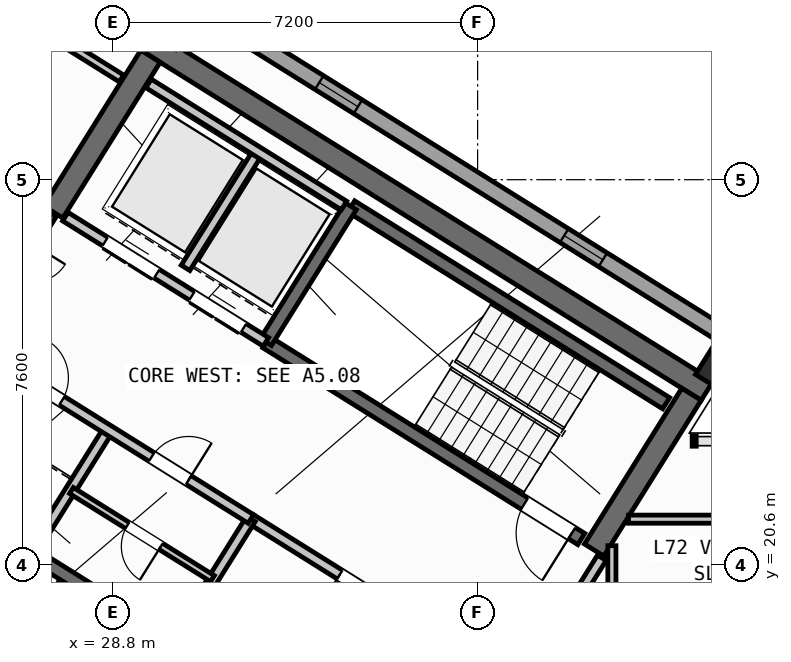
"""IFC4 building model, lengths in metres.
Left out: names, types, materials, properties, quantities, classifications, styles, units other than length and angle.
Written with IfcOpenShell. Run it as: python <this file> out.ifc"""

import sys

from ifc_helpers import new_model, si_unit, direction, frame, frame_2d, origin, origin_2d, place, context, subcontext, project, spatial, rectangle, hollow_rectangle, extrude, source, transform, mapped, element, fill, save


model = new_model("IFC4")
c1 = context("Model", 3, precision=1e-05, world=origin(), true_north=direction((0.0, 1.0)))
c2 = subcontext(c1, "Body", "Model", "MODEL_VIEW")
j1 = project(units=[si_unit("LENGTHUNIT", "METRE"), si_unit("PLANEANGLEUNIT", "RADIAN")], contexts=[c1])
p1 = place(None, origin())
s1 = spatial("IfcSite", under=j1, at=p1, CompositionType="ELEMENT")
p2 = place(p1, origin())
s2 = spatial("IfcBuilding", under=s1, at=p2, CompositionType="ELEMENT")
p3 = place(p2, frame((0.0, 0.0, 284.4)))
s3 = spatial("IfcBuildingStorey", under=s2, at=p3, CompositionType="ELEMENT", Elevation=284.4)
p4 = place(p3, frame((40.531, 24.036, 0.0), z_axis=(0.0, 0.0, 1.0), x_axis=(-0.848048787466, 0.529918157905, 0.0)))
e1 = element("IfcWall", 1, at=p4, inside=s3, PredefinedType="SHEAR", context=c2, shape_type="SweptSolid", body=[
    extrude(rectangle(XDim=13.04, YDim=0.45, at=frame_2d((6.52, 0.0))), origin(), (0.0, 0.0, 1.0), 3.35),
])
for number, where, z_axis, x_axis in (
    (2, (40.221, 23.965, 0.0), (0.0, 0.0, 1.0), (-0.53, -0.848, 0.0)),
    (3, (29.544, 30.636, 0.0), (0.0, 0.0, 1.0), (-0.53, -0.848, 0.0)),
):
    element("IfcWall", number, at=place(p3, frame(where, z_axis=z_axis, x_axis=x_axis)), inside=s3, PredefinedType="SHEAR", context=c2, shape_type="SweptSolid", body=[
        extrude(rectangle(XDim=3.625, YDim=0.45, at=frame_2d((1.812, 0.0))), origin(), (0.0, 0.0, 1.0), 3.35),
    ])
m1 = source(origin(), c2, "Body", "SweptSolid", [
    extrude(hollow_rectangle(XDim=0.7, YDim=0.7, WallThickness=0.028, at=origin_2d()), origin(), (0.0, 0.0, 1.0), 3.6),
])
p5 = place(p3, frame((40.783, 24.469, 0.0), z_axis=(0.0, 0.0, 1.0), x_axis=(-0.848048096156, 0.529919264233, 0.0)))
e4 = element("IfcColumn", 4, at=p5, inside=s3, PredefinedType="COLUMN", context=c2, shape_type="MappedRepresentation", body=[
    mapped(m1, transform((0.0, 0.0, 0.0), scale=1.0)),
])
p6 = place(p3, frame((19.566, 38.434, 0.0), z_axis=(0.0, 0.0, 1.0), x_axis=(0.84804567626, -0.529923136858, 0.0)))
e5 = element("IfcWall", 5, at=p6, inside=s3, PredefinedType="STANDARD", context=c2, shape_type="SweptSolid", body=[
    extrude(rectangle(XDim=25.188, YDim=0.32, at=frame_2d((12.594, 0.0))), origin(), (0.0, 0.0, 1.0), 3.35),
])
p7 = place(p6, frame((3.355, 0.0, 0.0)))
e6 = element("IfcOpeningElement", 6, at=p7, cuts=e5, PredefinedType="OPENING", context=c2, shape_type="SweptSolid", body=[
    extrude(rectangle(XDim=1.05, YDim=2.15, at=frame_2d((0.525, 1.075))), frame((0.0, 0.17, 0.0), z_axis=(0.0, -1.0, 0.0), x_axis=(1.0, 0.0, 0.0)), (0.0, 0.0, 1.0), 0.34),
])
p8 = place(p6, frame((0.939, 0.0, 0.9)))
e7 = element("IfcOpeningElement", 7, at=p8, cuts=e5, PredefinedType="OPENING", context=c2, shape_type="SweptSolid", body=[
    extrude(rectangle(XDim=1.65, YDim=1.45, at=frame_2d((0.825, 0.725))), frame((0.0, 0.17, 0.0), z_axis=(0.0, -1.0, 0.0), x_axis=(1.0, 0.0, 0.0)), (0.0, 0.0, 1.0), 0.34),
])
p9 = place(p6, frame((7.499, 0.0, 0.9)))
e8 = element("IfcOpeningElement", 8, at=p9, cuts=e5, PredefinedType="OPENING", context=c2, shape_type="SweptSolid", body=[
    extrude(rectangle(XDim=1.35, YDim=1.45, at=frame_2d((0.675, 0.725))), frame((0.0, 0.17, 0.0), z_axis=(0.0, -1.0, 0.0), x_axis=(1.0, 0.0, 0.0)), (0.0, 0.0, 1.0), 0.34),
])
p10 = place(p6, frame((10.754, 0.0, 1.0)))
e9 = element("IfcOpeningElement", 9, at=p10, cuts=e5, PredefinedType="OPENING", context=c2, shape_type="SweptSolid", body=[
    extrude(rectangle(XDim=0.9, YDim=1.25, at=frame_2d((0.45, 0.625))), frame((0.0, 0.17, 0.0), z_axis=(0.0, -1.0, 0.0), x_axis=(1.0, 0.0, 0.0)), (0.0, 0.0, 1.0), 0.34),
])
p11 = place(p6, frame((15.694, 0.0, 1.0)))
e10 = element("IfcOpeningElement", 10, at=p11, cuts=e5, PredefinedType="OPENING", context=c2, shape_type="SweptSolid", body=[
    extrude(rectangle(XDim=0.9, YDim=1.25, at=frame_2d((0.45, 0.625))), frame((0.0, 0.17, 0.0), z_axis=(0.0, -1.0, 0.0), x_axis=(1.0, 0.0, 0.0)), (0.0, 0.0, 1.0), 0.34),
])
p12 = place(p6, frame((21.394, 0.0, 1.0)))
e11 = element("IfcOpeningElement", 11, at=p12, cuts=e5, PredefinedType="OPENING", context=c2, shape_type="SweptSolid", body=[
    extrude(rectangle(XDim=0.9, YDim=1.25, at=frame_2d((0.45, 0.625))), frame((0.0, 0.17, 0.0), z_axis=(0.0, -1.0, 0.0), x_axis=(1.0, 0.0, 0.0)), (0.0, 0.0, 1.0), 0.34),
])
p13 = place(p3, frame((31.28, 18.261, 0.0), z_axis=(0.0, 0.0, 1.0), x_axis=(-0.848051618787, 0.529913626805, 0.0)))
e12 = element("IfcWall", 12, at=p13, inside=s3, PredefinedType="SHEAR", context=c2, shape_type="SweptSolid", body=[
    extrude(rectangle(XDim=7.46, YDim=0.26, at=frame_2d((3.73, 0.0))), origin(), (0.0, 0.0, 1.0), 3.35),
])
p14 = place(p13, frame((0.36, 0.0, 0.0)))
e13 = element("IfcOpeningElement", 13, at=p14, cuts=e12, PredefinedType="OPENING", context=c2, shape_type="SweptSolid", body=[
    extrude(rectangle(XDim=0.86, YDim=2.05, at=frame_2d((0.43, 1.025))), frame((0.0, 0.14, 0.0), z_axis=(0.0, -1.0, 0.0), x_axis=(1.0, 0.0, 0.0)), (0.0, 0.0, 1.0), 0.28),
])
p15 = place(p3, frame((39.721, 23.788, 0.0), z_axis=(0.0, 0.0, 1.0), x_axis=(-0.848054434086, 0.529909121291, 0.0)))
e14 = element("IfcWall", 14, at=p15, inside=s3, PredefinedType="SHEAR", context=c2, shape_type="SweptSolid", body=[
    extrude(rectangle(XDim=7.33, YDim=0.26, at=frame_2d((3.665, 0.0))), origin(), (0.0, 0.0, 1.0), 3.35),
])
p16 = place(p3, frame((38.046, 21.108, 0.0), z_axis=(0.0, 0.0, 1.0), x_axis=(-0.848054434086, 0.529909121291, 0.0)))
e15 = element("IfcWall", 15, at=p16, inside=s3, PredefinedType="SHEAR", context=c2, shape_type="SweptSolid", body=[
    extrude(rectangle(XDim=7.33, YDim=0.26, at=frame_2d((3.665, 0.0))), origin(), (0.0, 0.0, 1.0), 3.35),
])
p17 = place(p16, frame((0.22, 0.0, 0.0)))
e16 = element("IfcOpeningElement", 16, at=p17, cuts=e15, PredefinedType="OPENING", context=c2, shape_type="SweptSolid", body=[
    extrude(rectangle(XDim=1.1, YDim=2.1, at=frame_2d((0.55, 1.05))), frame((0.0, 0.14, 0.0), z_axis=(0.0, -1.0, 0.0), x_axis=(1.0, 0.0, 0.0)), (0.0, 0.0, 1.0), 0.28),
])
p18 = place(p3, frame((33.496, 27.677, 0.0), z_axis=(0.0, 0.0, 1.0), x_axis=(-0.529908658664, -0.84805472316, 0.0)))
e17 = element("IfcWall", 17, at=p18, inside=s3, PredefinedType="SHEAR", context=c2, shape_type="SweptSolid", body=[
    extrude(rectangle(XDim=3.16, YDim=0.26, at=frame_2d((1.58, 0.0))), origin(), (0.0, 0.0, 1.0), 3.35),
])
p19 = place(p3, frame((36.459, 18.421, 0.0), z_axis=(0.0, 0.0, 1.0), x_axis=(-0.848059591691, 0.529900867089, 0.0)))
e18 = element("IfcWall", 18, at=p19, inside=s3, PredefinedType="STANDARD", context=c2, shape_type="SweptSolid", body=[
    extrude(rectangle(XDim=5.818, YDim=0.2, at=frame_2d((2.909, 0.0))), origin(), (0.0, 0.0, 1.0), 3.34),
])
p20 = place(p19, frame((2.598, 0.0, 0.0)))
e19 = element("IfcOpeningElement", 19, at=p20, cuts=e18, PredefinedType="OPENING", context=c2, shape_type="SweptSolid", body=[
    extrude(rectangle(XDim=1.15, YDim=2.1, at=frame_2d((0.575, 1.05))), frame((0.0, 0.11, 0.0), z_axis=(0.0, -1.0, 0.0), x_axis=(1.0, 0.0, 0.0)), (0.0, 0.0, 1.0), 0.22),
])
p21 = place(p3, frame((31.822, 24.998, 0.0), z_axis=(0.0, 0.0, 1.0), x_axis=(-0.848054125777, 0.529909614701, 0.0)))
e20 = element("IfcWall", 20, at=p21, inside=s3, PredefinedType="STANDARD", context=c2, shape_type="SweptSolid", body=[
    extrude(rectangle(XDim=4.668, YDim=0.2, at=frame_2d((2.334, 0.0))), origin(), (0.0, 0.0, 1.0), 3.34),
])
p22 = place(p21, frame((0.52, 0.0, 0.0)))
e21 = element("IfcOpeningElement", 21, at=p22, cuts=e20, PredefinedType="OPENING", context=c2, shape_type="SweptSolid", body=[
    extrude(rectangle(XDim=1.2, YDim=2.15, at=frame_2d((0.6, 1.075))), frame((0.0, 0.11, 0.0), z_axis=(0.0, -1.0, 0.0), x_axis=(1.0, 0.0, 0.0)), (0.0, 0.0, 1.0), 0.22),
])
p23 = place(p21, frame((2.54, 0.0, 0.0)))
e22 = element("IfcOpeningElement", 22, at=p23, cuts=e20, PredefinedType="OPENING", context=c2, shape_type="SweptSolid", body=[
    extrude(rectangle(XDim=1.2, YDim=2.15, at=frame_2d((0.6, 1.075))), frame((0.0, 0.11, 0.0), z_axis=(0.0, -1.0, 0.0), x_axis=(1.0, 0.0, 0.0)), (0.0, 0.0, 1.0), 0.22),
])
p24 = place(p3, frame((31.645, 28.716, 0.0), z_axis=(0.0, 0.0, 1.0), x_axis=(-0.52986693015, -0.848080795876, 0.0)))
e23 = element("IfcWall", 23, at=p24, inside=s3, PredefinedType="STANDARD", context=c2, shape_type="SweptSolid", body=[
    extrude(rectangle(XDim=2.66, YDim=0.2, at=frame_2d((1.33, 0.0))), origin(), (0.0, 0.0, 1.0), 3.34),
])
p25 = place(p3, frame((33.363, 27.69, 0.0), z_axis=(0.0, 0.0, 1.0), x_axis=(-0.84804957148, 0.529916903215, 0.0)))
e24 = element("IfcWall", 24, at=p25, inside=s3, PredefinedType="STANDARD", context=c2, shape_type="SweptSolid", body=[
    extrude(rectangle(XDim=4.548, YDim=0.2, at=frame_2d((2.274, 0.0))), origin(), (0.0, 0.0, 1.0), 3.34),
])
for number, where, z_axis, x_axis in (
    (25, (31.525, 21.504, 0.0), (0.0, 0.0, 1.0), (-0.53, -0.848, 0.0)),
    (26, (28.71, 23.263, 0.0), (0.0, 0.0, 1.0), (-0.53, -0.848, 0.0)),
):
    element("IfcWall", number, at=place(p3, frame(where, z_axis=z_axis, x_axis=x_axis)), inside=s3, PredefinedType="STANDARD", context=c2, shape_type="SweptSolid", body=[
        extrude(rectangle(XDim=2.88, YDim=0.2, at=frame_2d((1.44, 0.0))), origin(), (0.0, 0.0, 1.0), 3.34),
    ])
p26 = place(p3, frame((31.525, 21.504, 0.0), z_axis=(0.0, 0.0, 1.0), x_axis=(-0.848042066329, 0.529928913853, 0.0)))
e27 = element("IfcWall", 27, at=p26, inside=s3, PredefinedType="STANDARD", context=c2, shape_type="SweptSolid", body=[
    extrude(rectangle(XDim=6.268, YDim=0.2, at=frame_2d((3.134, 0.0))), origin(), (0.0, 0.0, 1.0), 3.34),
])
p27 = place(p26, frame((4.4, 0.0, 0.0)))
e28 = element("IfcOpeningElement", 28, at=p27, cuts=e27, PredefinedType="OPENING", context=c2, shape_type="SweptSolid", body=[
    extrude(rectangle(XDim=0.86, YDim=2.05, at=frame_2d((0.43, 1.025))), frame((0.0, 0.11, 0.0), z_axis=(0.0, -1.0, 0.0), x_axis=(1.0, 0.0, 0.0)), (0.0, 0.0, 1.0), 0.22),
])
p28 = place(p26, frame((1.45, 0.0, 0.0)))
e29 = element("IfcOpeningElement", 29, at=p28, cuts=e27, PredefinedType="OPENING", context=c2, shape_type="SweptSolid", body=[
    extrude(rectangle(XDim=0.86, YDim=2.05, at=frame_2d((0.43, 1.025))), frame((0.0, 0.11, 0.0), z_axis=(0.0, -1.0, 0.0), x_axis=(1.0, 0.0, 0.0)), (0.0, 0.0, 1.0), 0.22),
])
p29 = place(p3, frame((30.766, 20.327, 0.0), z_axis=(0.0, 0.0, 1.0), x_axis=(-0.848052663127, 0.529911955482, 0.0)))
e30 = element("IfcWall", 30, at=p29, inside=s3, PredefinedType="PLUMBINGWALL", context=c2, shape_type="SweptSolid", body=[
    extrude(rectangle(XDim=3.28, YDim=0.14, at=frame_2d((1.64, 0.0))), origin(), (0.0, 0.0, 1.0), 3.34),
])
p30 = place(p29, frame((1.2, 0.0, 0.0)))
e31 = element("IfcOpeningElement", 31, at=p30, cuts=e30, PredefinedType="OPENING", context=c2, shape_type="SweptSolid", body=[
    extrude(rectangle(XDim=0.78, YDim=2.05, at=frame_2d((0.39, 1.025))), frame((0.0, 0.08, 0.0), z_axis=(0.0, -1.0, 0.0), x_axis=(1.0, 0.0, 0.0)), (0.0, 0.0, 1.0), 0.16),
])
p31 = place(p3, frame((27.596, 27.52, 0.0), z_axis=(0.0, 0.0, 1.0), x_axis=(-0.529865479138, -0.848081702443, 0.0)))
e32 = element("IfcWall", 32, at=p31, inside=s3, PredefinedType="STANDARD", context=c2, shape_type="SweptSolid", body=[
    extrude(rectangle(XDim=2.96, YDim=0.2, at=frame_2d((1.48, 0.0))), origin(), (0.0, 0.0, 1.0), 3.34),
])
p32 = place(p31, frame((0.7, 0.0, 0.0)))
e33 = element("IfcOpeningElement", 33, at=p32, cuts=e32, PredefinedType="OPENING", context=c2, shape_type="SweptSolid", body=[
    extrude(rectangle(XDim=1.5, YDim=2.15, at=frame_2d((0.75, 1.075))), frame((0.0, 0.11, 0.0), z_axis=(0.0, -1.0, 0.0), x_axis=(1.0, 0.0, 0.0)), (0.0, 0.0, 1.0), 0.22),
])
p33 = place(p3, frame((28.972, 30.198, 0.0), z_axis=(0.0, 0.0, 1.0), x_axis=(-0.848015752453, 0.529971021464, 0.0)))
e34 = element("IfcWall", 34, at=p33, inside=s3, PredefinedType="PARTITIONING", context=c2, shape_type="SweptSolid", body=[
    extrude(rectangle(XDim=2.358, YDim=0.16, at=frame_2d((1.179, 0.0))), origin(), (0.0, 0.0, 1.0), 3.34),
])
p34 = place(p3, frame((38.451, 20.737, 0.0), z_axis=(0.0, 0.0, 1.0), x_axis=(-0.529924799939, -0.848044637038, 0.0)))
e35 = element("IfcWall", 35, at=p34, inside=s3, PredefinedType="STANDARD", context=c2, shape_type="SweptSolid", body=[
    extrude(rectangle(XDim=2.96, YDim=0.2, at=frame_2d((1.48, 0.0))), origin(), (0.0, 0.0, 1.0), 3.34),
])
p35 = place(p34, frame((1.46, 0.0, 0.0)))
e36 = element("IfcOpeningElement", 36, at=p35, cuts=e35, PredefinedType="OPENING", context=c2, shape_type="SweptSolid", body=[
    extrude(rectangle(XDim=0.86, YDim=2.05, at=frame_2d((0.43, 1.025))), frame((0.0, 0.11, 0.0), z_axis=(0.0, -1.0, 0.0), x_axis=(1.0, 0.0, 0.0)), (0.0, 0.0, 1.0), 0.22),
])
p36 = place(p3, frame((38.65, 17.93, 0.0), z_axis=(0.0, 0.0, 1.0), x_axis=(0.0, 1.0, 0.0)))
e37 = element("IfcWall", 37, at=p36, inside=s3, PredefinedType="PARTITIONING", context=c2, shape_type="SweptSolid", body=[
    extrude(rectangle(XDim=3.046, YDim=0.16, at=frame_2d((1.523, 0.0))), origin(), (0.0, 0.0, 1.0), 3.34),
])
p37 = place(p3, frame((38.978, 21.5, 0.0), z_axis=(0.0, 0.0, 1.0), x_axis=(1.0, 0.0, 0.0)))
e38 = element("IfcWall", 38, at=p37, inside=s3, PredefinedType="PARTITIONING", context=c2, shape_type="SweptSolid", body=[
    extrude(rectangle(XDim=3.823, YDim=0.16, at=frame_2d((1.911, 0.0))), origin(), (0.0, 0.0, 1.0), 3.34),
])
m2 = source(origin(), c2, "Body", "SweptSolid", [
    extrude(rectangle(XDim=0.9, YDim=1.25, at=frame_2d((0.45, 0.625))), frame((0.0, 0.03, 0.0), z_axis=(0.0, -1.0, 0.0), x_axis=(1.0, 0.0, 0.0)), (0.0, 0.0, 1.0), 0.06),
])
p38 = place(p11, origin())
e39 = element("IfcWindow", 39, at=p38, inside=s3, PartitioningType="SINGLE_PANEL", PredefinedType="WINDOW", context=c2, shape_type="MappedRepresentation", body=[
    mapped(m2, transform((0.0, 0.0, 0.0), scale=1.0)),
])
fill(e10, e39)
p39 = place(p12, origin())
e40 = element("IfcWindow", 40, at=p39, inside=s3, PartitioningType="SINGLE_PANEL", PredefinedType="WINDOW", context=c2, shape_type="MappedRepresentation", body=[
    mapped(m2, transform((0.0, 0.0, 0.0), scale=1.0)),
])
fill(e11, e40)
m3 = source(origin(), c2, "Body", "SweptSolid", [
    extrude(rectangle(XDim=1.1, YDim=2.1, at=frame_2d((0.55, 1.05))), frame((0.0, 0.025, 0.0), z_axis=(0.0, -1.0, 0.0), x_axis=(1.0, 0.0, 0.0)), (0.0, 0.0, 1.0), 0.05),
])
p40 = place(p17, origin())
e41 = element("IfcDoor", 41, at=p40, inside=s3, OperationType="SINGLE_SWING_LEFT", PredefinedType="DOOR", context=c2, shape_type="MappedRepresentation", body=[
    mapped(m3, transform((0.0, 0.0, 0.0), scale=1.0)),
])
fill(e16, e41)
m4 = source(origin(), c2, "Body", "SweptSolid", [
    extrude(rectangle(XDim=1.15, YDim=2.1, at=frame_2d((0.575, 1.05))), frame((0.0, 0.025, 0.0), z_axis=(0.0, -1.0, 0.0), x_axis=(1.0, 0.0, 0.0)), (0.0, 0.0, 1.0), 0.05),
])
p41 = place(p20, origin())
e42 = element("IfcDoor", 42, at=p41, inside=s3, OperationType="SINGLE_SWING_RIGHT", PredefinedType="DOOR", context=c2, shape_type="MappedRepresentation", body=[
    mapped(m4, transform((0.0, 0.0, 0.0), scale=1.0)),
])
fill(e19, e42)
m5 = source(origin(), c2, "Body", "SweptSolid", [
    extrude(rectangle(XDim=1.2, YDim=2.15, at=frame_2d((0.6, 1.075))), frame((0.0, 0.025, 0.0), z_axis=(0.0, -1.0, 0.0), x_axis=(1.0, 0.0, 0.0)), (0.0, 0.0, 1.0), 0.05),
])
p42 = place(p22, origin())
e43 = element("IfcDoor", 43, at=p42, inside=s3, OperationType="DOUBLE_DOOR_SLIDING", PredefinedType="DOOR", context=c2, shape_type="MappedRepresentation", body=[
    mapped(m5, transform((0.0, 0.0, 0.0), scale=1.0)),
])
fill(e21, e43)
p43 = place(p23, origin())
e44 = element("IfcDoor", 44, at=p43, inside=s3, OperationType="DOUBLE_DOOR_SLIDING", PredefinedType="DOOR", context=c2, shape_type="MappedRepresentation", body=[
    mapped(m5, transform((0.0, 0.0, 0.0), scale=1.0)),
])
fill(e22, e44)
m6 = source(origin(), c2, "Body", "SweptSolid", [
    extrude(rectangle(XDim=0.86, YDim=2.05, at=frame_2d((0.43, 1.025))), frame((0.0, 0.025, 0.0), z_axis=(0.0, -1.0, 0.0), x_axis=(1.0, 0.0, 0.0)), (0.0, 0.0, 1.0), 0.05),
])
p44 = place(p27, frame((0.86, 0.0, 0.0), z_axis=(0.0, 0.0, 1.0), x_axis=(-1.0, 0.0, 0.0)))
e45 = element("IfcDoor", 45, at=p44, inside=s3, OperationType="SINGLE_SWING_LEFT", PredefinedType="DOOR", context=c2, shape_type="MappedRepresentation", body=[
    mapped(m6, transform((0.0, 0.0, 0.0), scale=1.0)),
])
fill(e28, e45)
p45 = place(p28, frame((0.86, 0.0, 0.0), z_axis=(0.0, 0.0, 1.0), x_axis=(-1.0, 0.0, 0.0)))
e46 = element("IfcDoor", 46, at=p45, inside=s3, OperationType="SINGLE_SWING_RIGHT", PredefinedType="DOOR", context=c2, shape_type="MappedRepresentation", body=[
    mapped(m6, transform((0.0, 0.0, 0.0), scale=1.0)),
])
fill(e29, e46)
m7 = source(origin(), c2, "Body", "SweptSolid", [
    extrude(rectangle(XDim=0.78, YDim=2.05, at=frame_2d((0.39, 1.025))), frame((0.0, 0.025, 0.0), z_axis=(0.0, -1.0, 0.0), x_axis=(1.0, 0.0, 0.0)), (0.0, 0.0, 1.0), 0.05),
])
p46 = place(p30, origin())
e47 = element("IfcDoor", 47, at=p46, inside=s3, OperationType="SINGLE_SWING_LEFT", PredefinedType="DOOR", context=c2, shape_type="MappedRepresentation", body=[
    mapped(m7, transform((0.0, 0.0, 0.0), scale=1.0)),
])
fill(e31, e47)
save(model, sys.argv[1])
